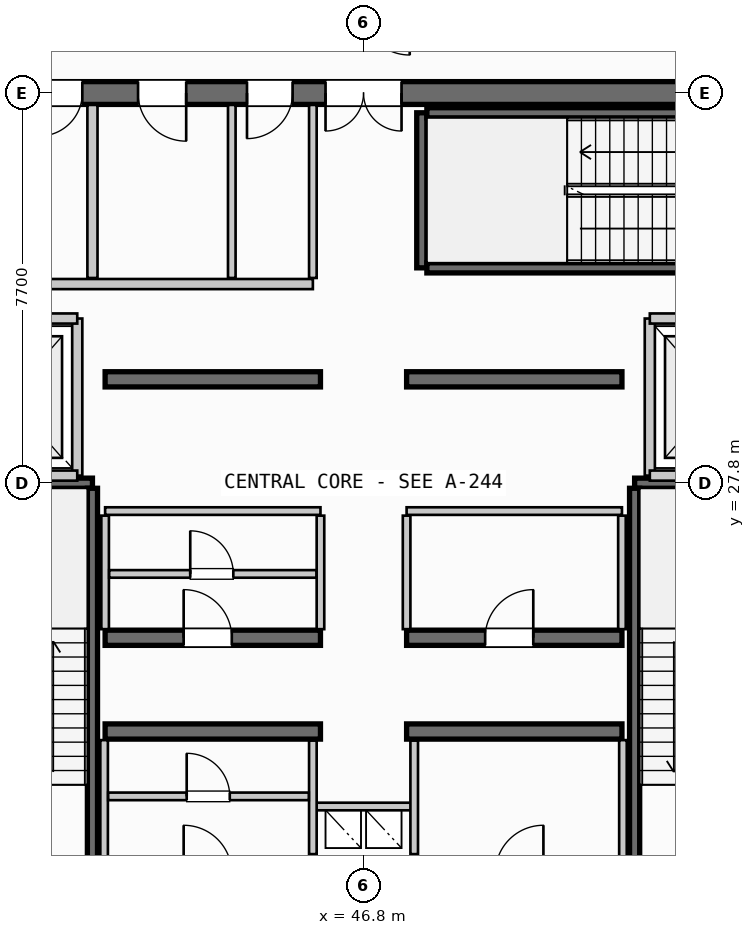
"""IFC4 building model, lengths in metres.
Left out: names, types, materials, properties, quantities, classifications, styles, units other than length and angle.
Written with IfcOpenShell. Run it as: python <this file> out.ifc"""

import sys

from ifc_helpers import new_model, si_unit, direction, frame, frame_2d, origin, place, context, subcontext, project, spatial, rectangle, extrude, source, transform, mapped, element, fill, save


model = new_model("IFC4")
c1 = context("Model", 3, precision=1e-05, world=origin(), true_north=direction((0.0, 1.0)))
c2 = subcontext(c1, "Body", "Model", "MODEL_VIEW")
j1 = project(units=[si_unit("LENGTHUNIT", "METRE"), si_unit("PLANEANGLEUNIT", "RADIAN")], contexts=[c1])
p1 = place(None, origin())
s1 = spatial("IfcSite", under=j1, at=p1, CompositionType="ELEMENT")
p2 = place(p1, origin())
s2 = spatial("IfcBuilding", under=s1, at=p2, CompositionType="ELEMENT")
p3 = place(p2, frame((0.0, 0.0, 316.3)))
s3 = spatial("IfcBuildingStorey", under=s2, at=p3, CompositionType="ELEMENT", Elevation=316.3)
p4 = place(p3, frame((55.6, 35.5, 0.0), z_axis=(0.0, 0.0, 1.0), x_axis=(-1.0, 0.0, 0.0)))
e1 = element("IfcWall", 1, at=p4, inside=s3, PredefinedType="SHEAR", context=c2, shape_type="SweptSolid", body=[
    extrude(rectangle(XDim=17.6, YDim=0.45, at=frame_2d((8.8, 0.0))), origin(), (0.0, 0.0, 1.0), 3.735),
])
p5 = place(p4, frame((8.05, 0.0, 0.0)))
e2 = element("IfcOpeningElement", 2, at=p5, cuts=e1, PredefinedType="OPENING", context=c2, shape_type="SweptSolid", body=[
    extrude(rectangle(XDim=1.5, YDim=2.2, at=frame_2d((0.75, 1.1))), frame((0.0, 0.235, 0.0), z_axis=(0.0, -1.0, 0.0), x_axis=(1.0, 0.0, 0.0)), (0.0, 0.0, 1.0), 0.47),
])
p6 = place(p4, frame((15.85, 0.0, 0.0)))
e3 = element("IfcOpeningElement", 3, at=p6, cuts=e1, PredefinedType="OPENING", context=c2, shape_type="SweptSolid", body=[
    extrude(rectangle(XDim=0.85, YDim=2.15, at=frame_2d((0.425, 1.075))), frame((0.0, 0.235, 0.0), z_axis=(0.0, -1.0, 0.0), x_axis=(1.0, 0.0, 0.0)), (0.0, 0.0, 1.0), 0.47),
])
p7 = place(p4, frame((14.35, 0.0, 0.0)))
e4 = element("IfcOpeningElement", 4, at=p7, cuts=e1, PredefinedType="OPENING", context=c2, shape_type="SweptSolid", body=[
    extrude(rectangle(XDim=0.85, YDim=2.15, at=frame_2d((0.425, 1.075))), frame((0.0, 0.235, 0.0), z_axis=(0.0, -1.0, 0.0), x_axis=(1.0, 0.0, 0.0)), (0.0, 0.0, 1.0), 0.47),
])
p8 = place(p4, frame((12.3, 0.0, 0.0)))
e5 = element("IfcOpeningElement", 5, at=p8, cuts=e1, PredefinedType="OPENING", context=c2, shape_type="SweptSolid", body=[
    extrude(rectangle(XDim=0.95, YDim=2.15, at=frame_2d((0.475, 1.075))), frame((0.0, 0.235, 0.0), z_axis=(0.0, -1.0, 0.0), x_axis=(1.0, 0.0, 0.0)), (0.0, 0.0, 1.0), 0.47),
])
p9 = place(p4, frame((10.2, 0.0, 0.0)))
e6 = element("IfcOpeningElement", 6, at=p9, cuts=e1, PredefinedType="OPENING", context=c2, shape_type="SweptSolid", body=[
    extrude(rectangle(XDim=0.9, YDim=2.15, at=frame_2d((0.45, 1.075))), frame((0.0, 0.235, 0.0), z_axis=(0.0, -1.0, 0.0), x_axis=(1.0, 0.0, 0.0)), (0.0, 0.0, 1.0), 0.47),
])
for number, where, z_axis, x_axis in (
    (7, (41.7, 22.9, 0.0), (0.0, 0.0, 1.0), (1.0, 0.0, 0.0)),
    (8, (47.65, 22.9, 0.0), (0.0, 0.0, 1.0), (1.0, 0.0, 0.0)),
):
    element("IfcWall", number, at=place(p3, frame(where, z_axis=z_axis, x_axis=x_axis)), inside=s3, PredefinedType="SHEAR", context=c2, shape_type="SweptSolid", body=[
        extrude(rectangle(XDim=4.25, YDim=0.3, at=frame_2d((2.125, 0.0))), origin(), (0.0, 0.0, 1.0), 3.735),
    ])
p10 = place(p3, frame((41.7, 24.75, 0.0), z_axis=(0.0, 0.0, 1.0), x_axis=(1.0, 0.0, 0.0)))
e9 = element("IfcWall", 9, at=p10, inside=s3, PredefinedType="SHEAR", context=c2, shape_type="SweptSolid", body=[
    extrude(rectangle(XDim=4.25, YDim=0.3, at=frame_2d((2.125, 0.0))), origin(), (0.0, 0.0, 1.0), 3.735),
])
p11 = place(p10, frame((1.55, 0.0, 0.0)))
e10 = element("IfcOpeningElement", 10, at=p11, cuts=e9, PredefinedType="OPENING", context=c2, shape_type="SweptSolid", body=[
    extrude(rectangle(XDim=0.95, YDim=2.15, at=frame_2d((0.475, 1.075))), frame((0.0, 0.16, 0.0), z_axis=(0.0, -1.0, 0.0), x_axis=(1.0, 0.0, 0.0)), (0.0, 0.0, 1.0), 0.32),
])
p12 = place(p3, frame((47.65, 24.75, 0.0), z_axis=(0.0, 0.0, 1.0), x_axis=(1.0, 0.0, 0.0)))
e11 = element("IfcWall", 11, at=p12, inside=s3, PredefinedType="SHEAR", context=c2, shape_type="SweptSolid", body=[
    extrude(rectangle(XDim=4.25, YDim=0.3, at=frame_2d((2.125, 0.0))), origin(), (0.0, 0.0, 1.0), 3.735),
])
p13 = place(p12, frame((1.55, 0.0, 0.0)))
e12 = element("IfcOpeningElement", 12, at=p13, cuts=e11, PredefinedType="OPENING", context=c2, shape_type="SweptSolid", body=[
    extrude(rectangle(XDim=0.95, YDim=2.15, at=frame_2d((0.475, 1.075))), frame((0.0, 0.16, 0.0), z_axis=(0.0, -1.0, 0.0), x_axis=(1.0, 0.0, 0.0)), (0.0, 0.0, 1.0), 0.32),
])
for number, where, z_axis, x_axis in (
    (13, (41.7, 29.85, 0.0), (0.0, 0.0, 1.0), (1.0, 0.0, 0.0)),
    (14, (47.65, 29.85, 0.0), (0.0, 0.0, 1.0), (1.0, 0.0, 0.0)),
):
    element("IfcWall", number, at=place(p3, frame(where, z_axis=z_axis, x_axis=x_axis)), inside=s3, PredefinedType="SHEAR", context=c2, shape_type="SweptSolid", body=[
        extrude(rectangle(XDim=4.25, YDim=0.3, at=frame_2d((2.125, 0.0))), origin(), (0.0, 0.0, 1.0), 3.735),
    ])
p14 = place(p3, frame((38.39, 27.8, 0.0), z_axis=(0.0, 0.0, 1.0), x_axis=(1.0, 0.0, 0.0)))
e15 = element("IfcWall", 15, at=p14, inside=s3, PredefinedType="SHEAR", context=c2, shape_type="SweptSolid", body=[
    extrude(rectangle(XDim=3.06, YDim=0.2, at=frame_2d((1.53, 0.0))), origin(), (0.0, 0.0, 1.0), 3.735),
])
p15 = place(p3, frame((41.45, 27.7, 0.0), z_axis=(0.0, 0.0, 1.0), x_axis=(0.0, -1.0, 0.0)))
e16 = element("IfcWall", 16, at=p15, inside=s3, PredefinedType="SHEAR", context=c2, shape_type="SweptSolid", body=[
    extrude(rectangle(XDim=7.35, YDim=0.2, at=frame_2d((3.675, 0.0))), origin(), (0.0, 0.0, 1.0), 3.735),
])
p16 = place(p3, frame((52.15, 27.8, 0.0), z_axis=(0.0, 0.0, 1.0), x_axis=(1.0, 0.0, 0.0)))
e17 = element("IfcWall", 17, at=p16, inside=s3, PredefinedType="SHEAR", context=c2, shape_type="SweptSolid", body=[
    extrude(rectangle(XDim=3.06, YDim=0.2, at=frame_2d((1.53, 0.0))), origin(), (0.0, 0.0, 1.0), 3.735),
])
p17 = place(p3, frame((52.15, 20.35, 0.0), z_axis=(0.0, 0.0, 1.0), x_axis=(0.0, 1.0, 0.0)))
e18 = element("IfcWall", 18, at=p17, inside=s3, PredefinedType="SHEAR", context=c2, shape_type="SweptSolid", body=[
    extrude(rectangle(XDim=7.35, YDim=0.2, at=frame_2d((3.675, 0.0))), origin(), (0.0, 0.0, 1.0), 3.735),
])
p18 = place(p3, frame((47.95, 32.05, 0.0), z_axis=(0.0, 0.0, 1.0), x_axis=(0.0, 1.0, 0.0)))
e19 = element("IfcWall", 19, at=p18, inside=s3, PredefinedType="SHEAR", context=c2, shape_type="SweptSolid", body=[
    extrude(rectangle(XDim=3.06, YDim=0.2, at=frame_2d((1.53, 0.0))), origin(), (0.0, 0.0, 1.0), 3.735),
])
for number, where, z_axis, x_axis in (
    (20, (48.05, 35.11, 0.0), (0.0, 0.0, 1.0), (1.0, 0.0, 0.0)),
    (21, (55.4, 32.05, 0.0), (0.0, 0.0, 1.0), (-1.0, 0.0, 0.0)),
):
    element("IfcWall", number, at=place(p3, frame(where, z_axis=z_axis, x_axis=x_axis)), inside=s3, PredefinedType="SHEAR", context=c2, shape_type="SweptSolid", body=[
        extrude(rectangle(XDim=7.35, YDim=0.2, at=frame_2d((3.675, 0.0))), origin(), (0.0, 0.0, 1.0), 3.735),
    ])
p19 = place(p3, frame((45.8, 21.42, 0.0), z_axis=(0.0, 0.0, 1.0), x_axis=(1.0, 0.0, 0.0)))
e22 = element("IfcWall", 22, at=p19, inside=s3, PredefinedType="PARTITIONING", context=c2, shape_type="SweptSolid", body=[
    extrude(rectangle(XDim=2.0, YDim=0.15, at=frame_2d((1.0, 0.0))), origin(), (0.0, 0.0, 1.0), 3.26),
])
for number, where, z_axis, x_axis in (
    (23, (45.8, 20.48, 0.0), (0.0, 0.0, 1.0), (0.0, 1.0, 0.0)),
    (24, (47.8, 20.48, 0.0), (0.0, 0.0, 1.0), (0.0, 1.0, 0.0)),
):
    element("IfcWall", number, at=place(p3, frame(where, z_axis=z_axis, x_axis=x_axis)), inside=s3, PredefinedType="PARTITIONING", context=c2, shape_type="SweptSolid", body=[
        extrude(rectangle(XDim=2.24, YDim=0.15, at=frame_2d((1.12, 0.0))), origin(), (0.0, 0.0, 1.0), 3.26),
    ])
p20 = place(p3, frame((41.15, 27.95, 0.0), z_axis=(0.0, 0.0, 1.0), x_axis=(0.0, 1.0, 0.0)))
e25 = element("IfcWall", 25, at=p20, inside=s3, PredefinedType="PARTITIONING", context=c2, shape_type="SweptSolid", body=[
    extrude(rectangle(XDim=3.1, YDim=0.2, at=frame_2d((1.55, 0.0))), origin(), (0.0, 0.0, 1.0), 3.26),
])
for number, where, z_axis, x_axis in (
    (26, (38.235, 27.95, 0.0), (0.0, 0.0, 1.0), (1.0, 0.0, 0.0)),
    (27, (38.235, 31.05, 0.0), (0.0, 0.0, 1.0), (1.0, 0.0, 0.0)),
):
    element("IfcWall", number, at=place(p3, frame(where, z_axis=z_axis, x_axis=x_axis)), inside=s3, PredefinedType="PARTITIONING", context=c2, shape_type="SweptSolid", body=[
        extrude(rectangle(XDim=2.915, YDim=0.2, at=frame_2d((1.458, 0.0))), origin(), (0.0, 0.0, 1.0), 3.26),
    ])
p21 = place(p3, frame((52.45, 27.95, 0.0), z_axis=(0.0, 0.0, 1.0), x_axis=(0.0, 1.0, 0.0)))
e28 = element("IfcWall", 28, at=p21, inside=s3, PredefinedType="PARTITIONING", context=c2, shape_type="SweptSolid", body=[
    extrude(rectangle(XDim=3.1, YDim=0.2, at=frame_2d((1.55, 0.0))), origin(), (0.0, 0.0, 1.0), 3.26),
])
for number, where, z_axis, x_axis in (
    (29, (52.45, 27.95, 0.0), (0.0, 0.0, 1.0), (1.0, 0.0, 0.0)),
    (30, (52.45, 31.05, 0.0), (0.0, 0.0, 1.0), (1.0, 0.0, 0.0)),
):
    element("IfcWall", number, at=place(p3, frame(where, z_axis=z_axis, x_axis=x_axis)), inside=s3, PredefinedType="PARTITIONING", context=c2, shape_type="SweptSolid", body=[
        extrude(rectangle(XDim=2.915, YDim=0.2, at=frame_2d((1.458, 0.0))), origin(), (0.0, 0.0, 1.0), 3.26),
    ])
for number, where, z_axis, x_axis in (
    (31, (41.68, 20.335, 0.0), (0.0, 0.0, 1.0), (0.0, 1.0, 0.0)),
    (32, (51.92, 20.335, 0.0), (0.0, 0.0, 1.0), (0.0, 1.0, 0.0)),
):
    element("IfcWall", number, at=place(p3, frame(where, z_axis=z_axis, x_axis=x_axis)), inside=s3, PredefinedType="PARTITIONING", context=c2, shape_type="SweptSolid", body=[
        extrude(rectangle(XDim=2.395, YDim=0.15, at=frame_2d((1.198, 0.0))), origin(), (0.0, 0.0, 1.0), 3.26),
    ])
p22 = place(p3, frame((41.76, 21.62, 0.0), z_axis=(0.0, 0.0, 1.0), x_axis=(1.0, 0.0, 0.0)))
e33 = element("IfcWall", 33, at=p22, inside=s3, PredefinedType="PARTITIONING", context=c2, shape_type="SweptSolid", body=[
    extrude(rectangle(XDim=3.96, YDim=0.15, at=frame_2d((1.98, 0.0))), origin(), (0.0, 0.0, 1.0), 3.26),
])
p23 = place(p22, frame((1.55, 0.0, 0.0)))
e34 = element("IfcOpeningElement", 34, at=p23, cuts=e33, PredefinedType="OPENING", context=c2, shape_type="SweptSolid", body=[
    extrude(rectangle(XDim=0.85, YDim=2.15, at=frame_2d((0.425, 1.075))), frame((0.0, 0.085, 0.0), z_axis=(0.0, -1.0, 0.0), x_axis=(1.0, 0.0, 0.0)), (0.0, 0.0, 1.0), 0.17),
])
for number, where, z_axis, x_axis in (
    (35, (41.7, 27.25, 0.0), (0.0, 0.0, 1.0), (1.0, 0.0, 0.0)),
    (36, (47.65, 27.25, 0.0), (0.0, 0.0, 1.0), (1.0, 0.0, 0.0)),
):
    element("IfcWall", number, at=place(p3, frame(where, z_axis=z_axis, x_axis=x_axis)), inside=s3, PredefinedType="PARTITIONING", context=c2, shape_type="SweptSolid", body=[
        extrude(rectangle(XDim=4.25, YDim=0.15, at=frame_2d((2.125, 0.0))), origin(), (0.0, 0.0, 1.0), 3.26),
    ])
for number, where, z_axis, x_axis in (
    (37, (41.7, 24.92, 0.0), (0.0, 0.0, 1.0), (0.0, 1.0, 0.0)),
    (38, (45.95, 24.92, 0.0), (0.0, 0.0, 1.0), (0.0, 1.0, 0.0)),
    (39, (47.65, 24.92, 0.0), (0.0, 0.0, 1.0), (0.0, 1.0, 0.0)),
    (40, (51.9, 24.92, 0.0), (0.0, 0.0, 1.0), (0.0, 1.0, 0.0)),
):
    element("IfcWall", number, at=place(p3, frame(where, z_axis=z_axis, x_axis=x_axis)), inside=s3, PredefinedType="PARTITIONING", context=c2, shape_type="SweptSolid", body=[
        extrude(rectangle(XDim=2.24, YDim=0.15, at=frame_2d((1.12, 0.0))), origin(), (0.0, 0.0, 1.0), 3.26),
    ])
p24 = place(p3, frame((41.78, 26.01, 0.0), z_axis=(0.0, 0.0, 1.0), x_axis=(1.0, 0.0, 0.0)))
e41 = element("IfcWall", 41, at=p24, inside=s3, PredefinedType="PARTITIONING", context=c2, shape_type="SweptSolid", body=[
    extrude(rectangle(XDim=4.09, YDim=0.15, at=frame_2d((2.045, 0.0))), origin(), (0.0, 0.0, 1.0), 3.26),
])
p25 = place(p24, frame((1.6, 0.0, 0.0)))
e42 = element("IfcOpeningElement", 42, at=p25, cuts=e41, PredefinedType="OPENING", context=c2, shape_type="SweptSolid", body=[
    extrude(rectangle(XDim=0.85, YDim=2.15, at=frame_2d((0.425, 1.075))), frame((0.0, 0.085, 0.0), z_axis=(0.0, -1.0, 0.0), x_axis=(1.0, 0.0, 0.0)), (0.0, 0.0, 1.0), 0.17),
])
p26 = place(p3, frame((41.45, 31.85, 0.0), z_axis=(0.0, 0.0, 1.0), x_axis=(0.0, 1.0, 0.0)))
e43 = element("IfcWall", 43, at=p26, inside=s3, PredefinedType="PARTITIONING", context=c2, shape_type="SweptSolid", body=[
    extrude(rectangle(XDim=3.415, YDim=0.2, at=frame_2d((1.708, 0.0))), origin(), (0.0, 0.0, 1.0), 3.26),
])
p27 = place(p3, frame((38.235, 31.73, 0.0), z_axis=(0.0, 0.0, 1.0), x_axis=(1.0, 0.0, 0.0)))
e44 = element("IfcWall", 44, at=p27, inside=s3, PredefinedType="PARTITIONING", context=c2, shape_type="SweptSolid", body=[
    extrude(rectangle(XDim=7.565, YDim=0.2, at=frame_2d((3.782, 0.0))), origin(), (0.0, 0.0, 1.0), 3.26),
])
p28 = place(p3, frame((45.8, 31.85, 0.0), z_axis=(0.0, 0.0, 1.0), x_axis=(0.0, 1.0, 0.0)))
e45 = element("IfcWall", 45, at=p28, inside=s3, PredefinedType="PARTITIONING", context=c2, shape_type="SweptSolid", body=[
    extrude(rectangle(XDim=3.415, YDim=0.15, at=frame_2d((1.708, 0.0))), origin(), (0.0, 0.0, 1.0), 3.26),
])
p29 = place(p3, frame((44.2, 31.85, 0.0), z_axis=(0.0, 0.0, 1.0), x_axis=(0.0, 1.0, 0.0)))
e46 = element("IfcWall", 46, at=p29, inside=s3, PredefinedType="PLUMBINGWALL", context=c2, shape_type="SweptSolid", body=[
    extrude(rectangle(XDim=3.415, YDim=0.15, at=frame_2d((1.708, 0.0))), origin(), (0.0, 0.0, 1.0), 3.26),
])
m1 = source(origin(), c2, "Body", "SweptSolid", [
    extrude(rectangle(XDim=1.5, YDim=2.2, at=frame_2d((0.75, 1.1))), frame((0.0, 0.025, 0.0), z_axis=(0.0, -1.0, 0.0), x_axis=(1.0, 0.0, 0.0)), (0.0, 0.0, 1.0), 0.05),
])
p30 = place(p5, origin())
e47 = element("IfcDoor", 47, at=p30, inside=s3, OperationType="DOUBLE_DOOR_SINGLE_SWING", PredefinedType="DOOR", context=c2, shape_type="MappedRepresentation", body=[
    mapped(m1, transform((0.0, 0.0, 0.0), scale=1.0)),
])
fill(e2, e47)
m2 = source(origin(), c2, "Body", "SweptSolid", [
    extrude(rectangle(XDim=0.95, YDim=2.15, at=frame_2d((0.475, 1.075))), frame((0.0, 0.025, 0.0), z_axis=(0.0, -1.0, 0.0), x_axis=(1.0, 0.0, 0.0)), (0.0, 0.0, 1.0), 0.05),
])
p31 = place(p11, origin())
e48 = element("IfcDoor", 48, at=p31, inside=s3, OperationType="SINGLE_SWING_LEFT", PredefinedType="DOOR", context=c2, shape_type="MappedRepresentation", body=[
    mapped(m2, transform((0.0, 0.0, 0.0), scale=1.0)),
])
fill(e10, e48)
p32 = place(p13, origin())
e49 = element("IfcDoor", 49, at=p32, inside=s3, OperationType="SINGLE_SWING_RIGHT", PredefinedType="DOOR", context=c2, shape_type="MappedRepresentation", body=[
    mapped(m2, transform((0.0, 0.0, 0.0), scale=1.0)),
])
fill(e12, e49)
m3 = source(origin(), c2, "Body", "SweptSolid", [
    extrude(rectangle(XDim=0.85, YDim=2.15, at=frame_2d((0.425, 1.075))), frame((0.0, 0.025, 0.0), z_axis=(0.0, -1.0, 0.0), x_axis=(1.0, 0.0, 0.0)), (0.0, 0.0, 1.0), 0.05),
])
p33 = place(p7, origin())
e50 = element("IfcDoor", 50, at=p33, inside=s3, OperationType="SINGLE_SWING_RIGHT", PredefinedType="DOOR", context=c2, shape_type="MappedRepresentation", body=[
    mapped(m3, transform((0.0, 0.0, 0.0), scale=1.0)),
])
fill(e4, e50)
p34 = place(p8, origin())
e51 = element("IfcDoor", 51, at=p34, inside=s3, OperationType="SINGLE_SWING_LEFT", PredefinedType="DOOR", context=c2, shape_type="MappedRepresentation", body=[
    mapped(m2, transform((0.0, 0.0, 0.0), scale=1.0)),
])
fill(e5, e51)
m4 = source(origin(), c2, "Body", "SweptSolid", [
    extrude(rectangle(XDim=0.9, YDim=2.15, at=frame_2d((0.45, 1.075))), frame((0.0, 0.025, 0.0), z_axis=(0.0, -1.0, 0.0), x_axis=(1.0, 0.0, 0.0)), (0.0, 0.0, 1.0), 0.05),
])
p35 = place(p9, origin())
e52 = element("IfcDoor", 52, at=p35, inside=s3, OperationType="SINGLE_SWING_RIGHT", PredefinedType="DOOR", context=c2, shape_type="MappedRepresentation", body=[
    mapped(m4, transform((0.0, 0.0, 0.0), scale=1.0)),
])
fill(e6, e52)
p36 = place(p23, origin())
e53 = element("IfcDoor", 53, at=p36, inside=s3, OperationType="SINGLE_SWING_LEFT", PredefinedType="DOOR", context=c2, shape_type="MappedRepresentation", body=[
    mapped(m3, transform((0.0, 0.0, 0.0), scale=1.0)),
])
fill(e34, e53)
p37 = place(p25, origin())
e54 = element("IfcDoor", 54, at=p37, inside=s3, OperationType="SINGLE_SWING_LEFT", PredefinedType="DOOR", context=c2, shape_type="MappedRepresentation", body=[
    mapped(m3, transform((0.0, 0.0, 0.0), scale=1.0)),
])
fill(e42, e54)
save(model, sys.argv[1])
